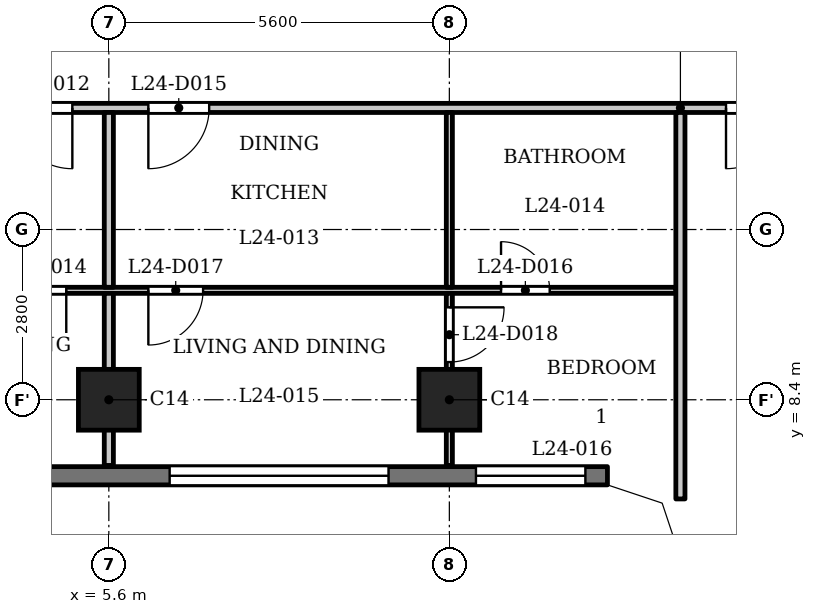
"""IFC4 building model, lengths in metres.
Left out: names, types, materials, properties, quantities, classifications, styles, units other than length and angle.
Written with IfcOpenShell. Run it as: python <this file> out.ifc"""

import sys

from ifc_helpers import new_model, si_unit, direction, frame, frame_2d, origin, origin_2d, place, context, subcontext, project, spatial, polyline, rectangle, outline, extrude, element, fill, save


model = new_model("IFC4")
c1 = context("Model", 3, precision=1e-05, world=origin(), true_north=direction((0.0, 1.0)))
c2 = subcontext(c1, "Body", "Model", "MODEL_VIEW")
j1 = project(units=[si_unit("LENGTHUNIT", "METRE"), si_unit("PLANEANGLEUNIT", "RADIAN")], contexts=[c1])
p1 = place(None, origin())
s1 = spatial("IfcSite", under=j1, at=p1, CompositionType="ELEMENT")
p2 = place(p1, origin())
s2 = spatial("IfcBuilding", under=s1, at=p2, CompositionType="ELEMENT")
p3 = place(p2, frame((0.0, 0.0, 97.3)))
s3 = spatial("IfcBuildingStorey", under=s2, at=p3, CompositionType="ELEMENT", Elevation=97.3)
for number, where, z_axis, x_axis in (
    (1, (5.6, 8.4, 0.0), (0.0, 0.0, 1.0), (1.0, 0.0, 0.0)),
    (2, (11.2, 8.4, 0.0), (0.0, 0.0, 1.0), (1.0, 0.0, 0.0)),
):
    element("IfcColumn", number, at=place(p3, frame(where, z_axis=z_axis, x_axis=x_axis)), inside=s3, PredefinedType="COLUMN", context=c2, shape_type="SweptSolid", body=[
        extrude(rectangle(XDim=1.0, YDim=1.0, at=origin_2d()), origin(), (0.0, 0.0, 1.0), 3.5),
    ])
p4 = place(p3, frame((-13.8, 7.15, 0.0), z_axis=(0.0, 0.0, 1.0), x_axis=(1.0, 0.0, 0.0)))
e3 = element("IfcWall", 3, at=p4, inside=s3, PredefinedType="SOLIDWALL", context=c2, shape_type="SweptSolid", body=[
    extrude(rectangle(XDim=27.6, YDim=0.3, at=frame_2d((13.8, 0.0))), origin(), (0.0, 0.0, 1.0), 3.2),
])
p5 = place(p4, frame((0.363, 0.0, 0.9)))
e4 = element("IfcOpeningElement", 4, at=p5, cuts=e3, PredefinedType="OPENING", context=c2, shape_type="SweptSolid", body=[
    extrude(rectangle(XDim=1.8, YDim=1.25, at=frame_2d((0.9, 0.625))), frame((0.0, 0.16, 0.0), z_axis=(0.0, -1.0, 0.0), x_axis=(1.0, 0.0, 0.0)), (0.0, 0.0, 1.0), 0.32),
])
p6 = place(p4, frame((3.6, 0.0, 1.2)))
e5 = element("IfcOpeningElement", 5, at=p6, cuts=e3, PredefinedType="OPENING", context=c2, shape_type="SweptSolid", body=[
    extrude(rectangle(XDim=3.6, YDim=0.95, at=frame_2d((1.8, 0.475))), frame((0.0, 0.16, 0.0), z_axis=(0.0, -1.0, 0.0), x_axis=(1.0, 0.0, 0.0)), (0.0, 0.0, 1.0), 0.32),
])
p7 = place(p4, frame((9.2, 0.0, 1.2)))
e6 = element("IfcOpeningElement", 6, at=p7, cuts=e3, PredefinedType="OPENING", context=c2, shape_type="SweptSolid", body=[
    extrude(rectangle(XDim=3.6, YDim=0.95, at=frame_2d((1.8, 0.475))), frame((0.0, 0.16, 0.0), z_axis=(0.0, -1.0, 0.0), x_axis=(1.0, 0.0, 0.0)), (0.0, 0.0, 1.0), 0.32),
])
p8 = place(p4, frame((14.8, 0.0, 1.2)))
e7 = element("IfcOpeningElement", 7, at=p8, cuts=e3, PredefinedType="OPENING", context=c2, shape_type="SweptSolid", body=[
    extrude(rectangle(XDim=3.6, YDim=0.95, at=frame_2d((1.8, 0.475))), frame((0.0, 0.16, 0.0), z_axis=(0.0, -1.0, 0.0), x_axis=(1.0, 0.0, 0.0)), (0.0, 0.0, 1.0), 0.32),
])
p9 = place(p4, frame((20.4, 0.0, 1.2)))
e8 = element("IfcOpeningElement", 8, at=p9, cuts=e3, PredefinedType="OPENING", context=c2, shape_type="SweptSolid", body=[
    extrude(rectangle(XDim=3.6, YDim=0.95, at=frame_2d((1.8, 0.475))), frame((0.0, 0.16, 0.0), z_axis=(0.0, -1.0, 0.0), x_axis=(1.0, 0.0, 0.0)), (0.0, 0.0, 1.0), 0.32),
])
p10 = place(p4, frame((25.438, 0.0, 0.9)))
e9 = element("IfcOpeningElement", 9, at=p10, cuts=e3, PredefinedType="OPENING", context=c2, shape_type="SweptSolid", body=[
    extrude(rectangle(XDim=1.8, YDim=1.25, at=frame_2d((0.9, 0.625))), frame((0.0, 0.16, 0.0), z_axis=(0.0, -1.0, 0.0), x_axis=(1.0, 0.0, 0.0)), (0.0, 0.0, 1.0), 0.32),
])
p11 = place(p3, frame((-14.925, 10.2, 0.0), z_axis=(0.0, 0.0, 1.0), x_axis=(1.0, 0.0, 0.0)))
e10 = element("IfcWall", 10, at=p11, inside=s3, PredefinedType="PARTITIONING", context=c2, shape_type="SweptSolid", body=[
    extrude(rectangle(XDim=29.85, YDim=0.1, at=frame_2d((14.925, 0.0))), origin(), (0.0, 0.0, 1.0), 3.2),
])
p12 = place(p11, frame((0.525, 0.0, 0.0)))
e11 = element("IfcOpeningElement", 11, at=p12, cuts=e10, PredefinedType="OPENING", context=c2, shape_type="SweptSolid", body=[
    extrude(rectangle(XDim=0.8, YDim=2.1, at=frame_2d((0.4, 1.05))), frame((0.0, 0.06, 0.0), z_axis=(0.0, -1.0, 0.0), x_axis=(1.0, 0.0, 0.0)), (0.0, 0.0, 1.0), 0.12),
])
p13 = place(p11, frame((4.375, 0.0, 0.0)))
e12 = element("IfcOpeningElement", 12, at=p13, cuts=e10, PredefinedType="OPENING", context=c2, shape_type="SweptSolid", body=[
    extrude(rectangle(XDim=0.9, YDim=2.1, at=frame_2d((0.45, 1.05))), frame((0.0, 0.06, 0.0), z_axis=(0.0, -1.0, 0.0), x_axis=(1.0, 0.0, 0.0)), (0.0, 0.0, 1.0), 0.12),
])
p14 = place(p11, frame((10.125, 0.0, 0.0)))
e13 = element("IfcOpeningElement", 13, at=p14, cuts=e10, PredefinedType="OPENING", context=c2, shape_type="SweptSolid", body=[
    extrude(rectangle(XDim=0.8, YDim=2.1, at=frame_2d((0.4, 1.05))), frame((0.0, 0.06, 0.0), z_axis=(0.0, -1.0, 0.0), x_axis=(1.0, 0.0, 0.0)), (0.0, 0.0, 1.0), 0.12),
])
p15 = place(p11, frame((12.975, 0.0, 0.0)))
e14 = element("IfcOpeningElement", 14, at=p15, cuts=e10, PredefinedType="OPENING", context=c2, shape_type="SweptSolid", body=[
    extrude(rectangle(XDim=0.9, YDim=2.1, at=frame_2d((0.45, 1.05))), frame((0.0, 0.06, 0.0), z_axis=(0.0, -1.0, 0.0), x_axis=(1.0, 0.0, 0.0)), (0.0, 0.0, 1.0), 0.12),
])
p16 = place(p11, frame((16.075, 0.0, 0.0)))
e15 = element("IfcOpeningElement", 15, at=p16, cuts=e10, PredefinedType="OPENING", context=c2, shape_type="SweptSolid", body=[
    extrude(rectangle(XDim=0.8, YDim=2.1, at=frame_2d((0.4, 1.05))), frame((0.0, 0.06, 0.0), z_axis=(0.0, -1.0, 0.0), x_axis=(1.0, 0.0, 0.0)), (0.0, 0.0, 1.0), 0.12),
])
p17 = place(p11, frame((18.925, 0.0, 0.0)))
e16 = element("IfcOpeningElement", 16, at=p17, cuts=e10, PredefinedType="OPENING", context=c2, shape_type="SweptSolid", body=[
    extrude(rectangle(XDim=0.9, YDim=2.1, at=frame_2d((0.45, 1.05))), frame((0.0, 0.06, 0.0), z_axis=(0.0, -1.0, 0.0), x_axis=(1.0, 0.0, 0.0)), (0.0, 0.0, 1.0), 0.12),
])
p18 = place(p11, frame((26.975, 0.0, 0.0)))
e17 = element("IfcOpeningElement", 17, at=p18, cuts=e10, PredefinedType="OPENING", context=c2, shape_type="SweptSolid", body=[
    extrude(rectangle(XDim=0.8, YDim=2.1, at=frame_2d((0.4, 1.05))), frame((0.0, 0.06, 0.0), z_axis=(0.0, -1.0, 0.0), x_axis=(1.0, 0.0, 0.0)), (0.0, 0.0, 1.0), 0.12),
])
p19 = place(p11, frame((21.175, 0.0, 0.0)))
e18 = element("IfcOpeningElement", 18, at=p19, cuts=e10, PredefinedType="OPENING", context=c2, shape_type="SweptSolid", body=[
    extrude(rectangle(XDim=0.9, YDim=2.1, at=frame_2d((0.45, 1.05))), frame((0.0, 0.06, 0.0), z_axis=(0.0, -1.0, 0.0), x_axis=(1.0, 0.0, 0.0)), (0.0, 0.0, 1.0), 0.12),
])
p20 = place(p3, frame((-17.4, 13.2, 0.0), z_axis=(0.0, 0.0, 1.0), x_axis=(1.0, 0.0, 0.0)))
e19 = element("IfcWall", 19, at=p20, inside=s3, PredefinedType="PARTITIONING", context=c2, shape_type="SweptSolid", body=[
    extrude(rectangle(XDim=34.8, YDim=0.15, at=frame_2d((17.4, 0.0))), origin(), (0.0, 0.0, 1.0), 3.2),
])
p21 = place(p20, frame((0.75, 0.0, 0.0)))
e20 = element("IfcOpeningElement", 20, at=p21, cuts=e19, PredefinedType="OPENING", context=c2, shape_type="SweptSolid", body=[
    extrude(rectangle(XDim=1.0, YDim=2.1, at=frame_2d((0.5, 1.05))), frame((0.0, 0.085, 0.0), z_axis=(0.0, -1.0, 0.0), x_axis=(1.0, 0.0, 0.0)), (0.0, 0.0, 1.0), 0.17),
])
p22 = place(p20, frame((33.15, 0.0, 0.0)))
e21 = element("IfcOpeningElement", 21, at=p22, cuts=e19, PredefinedType="OPENING", context=c2, shape_type="SweptSolid", body=[
    extrude(rectangle(XDim=1.0, YDim=2.1, at=frame_2d((0.5, 1.05))), frame((0.0, 0.085, 0.0), z_axis=(0.0, -1.0, 0.0), x_axis=(1.0, 0.0, 0.0)), (0.0, 0.0, 1.0), 0.17),
])
p23 = place(p20, frame((6.85, 0.0, 0.0)))
e22 = element("IfcOpeningElement", 22, at=p23, cuts=e19, PredefinedType="OPENING", context=c2, shape_type="SweptSolid", body=[
    extrude(rectangle(XDim=1.0, YDim=2.1, at=frame_2d((0.5, 1.05))), frame((0.0, 0.085, 0.0), z_axis=(0.0, -1.0, 0.0), x_axis=(1.0, 0.0, 0.0)), (0.0, 0.0, 1.0), 0.17),
])
p24 = place(p20, frame((15.45, 0.0, 0.0)))
e23 = element("IfcOpeningElement", 23, at=p24, cuts=e19, PredefinedType="OPENING", context=c2, shape_type="SweptSolid", body=[
    extrude(rectangle(XDim=1.0, YDim=2.1, at=frame_2d((0.5, 1.05))), frame((0.0, 0.085, 0.0), z_axis=(0.0, -1.0, 0.0), x_axis=(1.0, 0.0, 0.0)), (0.0, 0.0, 1.0), 0.17),
])
p25 = place(p20, frame((21.4, 0.0, 0.0)))
e24 = element("IfcOpeningElement", 24, at=p25, cuts=e19, PredefinedType="OPENING", context=c2, shape_type="SweptSolid", body=[
    extrude(rectangle(XDim=1.0, YDim=2.1, at=frame_2d((0.5, 1.05))), frame((0.0, 0.085, 0.0), z_axis=(0.0, -1.0, 0.0), x_axis=(1.0, 0.0, 0.0)), (0.0, 0.0, 1.0), 0.17),
])
p26 = place(p20, frame((23.65, 0.0, 0.0)))
e25 = element("IfcOpeningElement", 25, at=p26, cuts=e19, PredefinedType="OPENING", context=c2, shape_type="SweptSolid", body=[
    extrude(rectangle(XDim=1.0, YDim=2.1, at=frame_2d((0.5, 1.05))), frame((0.0, 0.085, 0.0), z_axis=(0.0, -1.0, 0.0), x_axis=(1.0, 0.0, 0.0)), (0.0, 0.0, 1.0), 0.17),
])
p27 = place(p3, frame((5.6, 7.32, 0.0), z_axis=(0.0, 0.0, 1.0), x_axis=(0.0, 1.0, 0.0)))
e26 = element("IfcWall", 26, at=p27, inside=s3, PredefinedType="PARTITIONING", context=c2, shape_type="SweptSolid", body=[
    extrude(rectangle(XDim=2.83, YDim=0.15, at=frame_2d((1.415, 0.0))), origin(), (0.0, 0.0, 1.0), 3.2),
])
p28 = place(p3, frame((5.6, 10.25, 0.0), z_axis=(0.0, 0.0, 1.0), x_axis=(0.0, 1.0, 0.0)))
e27 = element("IfcWall", 27, at=p28, inside=s3, PredefinedType="PARTITIONING", context=c2, shape_type="SweptSolid", body=[
    extrude(rectangle(XDim=2.875, YDim=0.15, at=frame_2d((1.438, 0.0))), origin(), (0.0, 0.0, 1.0), 3.2),
])
p29 = place(p3, frame((11.2, 7.32, 0.0), z_axis=(0.0, 0.0, 1.0), x_axis=(0.0, 1.0, 0.0)))
e28 = element("IfcWall", 28, at=p29, inside=s3, PredefinedType="PARTITIONING", context=c2, shape_type="SweptSolid", body=[
    extrude(rectangle(XDim=2.83, YDim=0.1, at=frame_2d((1.415, 0.0))), origin(), (0.0, 0.0, 1.0), 3.2),
])
p30 = place(p29, frame((1.7, 0.0, 0.0)))
e29 = element("IfcOpeningElement", 29, at=p30, cuts=e28, PredefinedType="OPENING", context=c2, shape_type="SweptSolid", body=[
    extrude(rectangle(XDim=0.9, YDim=2.1, at=frame_2d((0.45, 1.05))), frame((0.0, 0.06, 0.0), z_axis=(0.0, -1.0, 0.0), x_axis=(1.0, 0.0, 0.0)), (0.0, 0.0, 1.0), 0.12),
])
p31 = place(p3, frame((11.2, 10.25, 0.0), z_axis=(0.0, 0.0, 1.0), x_axis=(0.0, 1.0, 0.0)))
e30 = element("IfcWall", 30, at=p31, inside=s3, PredefinedType="PARTITIONING", context=c2, shape_type="SweptSolid", body=[
    extrude(rectangle(XDim=2.875, YDim=0.1, at=frame_2d((1.438, 0.0))), origin(), (0.0, 0.0, 1.0), 3.2),
])
p32 = place(p3, frame((15.0, 6.769, 0.0), z_axis=(0.0, 0.0, 1.0), x_axis=(0.0, 1.0, 0.0)))
e31 = element("IfcWall", 31, at=p32, inside=s3, PredefinedType="PARTITIONING", context=c2, shape_type="SweptSolid", body=[
    extrude(rectangle(XDim=6.356, YDim=0.15, at=frame_2d((3.178, 0.0))), origin(), (0.0, 0.0, 1.0), 3.2),
])
p33 = place(p3, origin())
e32 = element("IfcWall", 32, at=p33, inside=s3, PredefinedType="SOLIDWALL", context=c2, shape_type="SweptSolid", body=[
    extrude(outline(polyline([(14.937, 6.937), (13.849, 7.3), (13.8, 7.3), (13.8, 7.0), (14.7, 6.7), (15.0, 5.8), (15.3, 5.8), (15.3, 5.849), (14.937, 6.937)])), origin(), (0.0, 0.0, 1.0), 3.2),
])
p34 = place(p22, origin())
e33 = element("IfcDoor", 33, at=p34, inside=s3, OperationType="SINGLE_SWING_LEFT", PredefinedType="DOOR", context=c2, shape_type="SweptSolid", body=[
    extrude(rectangle(XDim=1.0, YDim=2.1, at=frame_2d((0.5, 1.05))), frame((0.0, 0.025, 0.0), z_axis=(0.0, -1.0, 0.0), x_axis=(1.0, 0.0, 0.0)), (0.0, 0.0, 1.0), 0.05),
])
fill(e21, e33)
p35 = place(p25, origin())
e34 = element("IfcDoor", 34, at=p35, inside=s3, OperationType="SINGLE_SWING_RIGHT", PredefinedType="DOOR", context=c2, shape_type="SweptSolid", body=[
    extrude(rectangle(XDim=1.0, YDim=2.1, at=frame_2d((0.5, 1.05))), frame((0.0, 0.025, 0.0), z_axis=(0.0, -1.0, 0.0), x_axis=(1.0, 0.0, 0.0)), (0.0, 0.0, 1.0), 0.05),
])
fill(e24, e34)
p36 = place(p17, origin())
e35 = element("IfcDoor", 35, at=p36, inside=s3, OperationType="SINGLE_SWING_RIGHT", PredefinedType="DOOR", context=c2, shape_type="SweptSolid", body=[
    extrude(rectangle(XDim=0.9, YDim=2.1, at=frame_2d((0.45, 1.05))), frame((0.0, 0.025, 0.0), z_axis=(0.0, -1.0, 0.0), x_axis=(1.0, 0.0, 0.0)), (0.0, 0.0, 1.0), 0.05),
])
fill(e16, e35)
p37 = place(p26, origin())
e36 = element("IfcDoor", 36, at=p37, inside=s3, OperationType="SINGLE_SWING_LEFT", PredefinedType="DOOR", context=c2, shape_type="SweptSolid", body=[
    extrude(rectangle(XDim=1.0, YDim=2.1, at=frame_2d((0.5, 1.05))), frame((0.0, 0.025, 0.0), z_axis=(0.0, -1.0, 0.0), x_axis=(1.0, 0.0, 0.0)), (0.0, 0.0, 1.0), 0.05),
])
fill(e25, e36)
p38 = place(p18, origin())
e37 = element("IfcDoor", 37, at=p38, inside=s3, OperationType="SINGLE_SWING_RIGHT", PredefinedType="DOOR", context=c2, shape_type="SweptSolid", body=[
    extrude(rectangle(XDim=0.8, YDim=2.1, at=frame_2d((0.4, 1.05))), frame((0.0, 0.025, 0.0), z_axis=(0.0, -1.0, 0.0), x_axis=(1.0, 0.0, 0.0)), (0.0, 0.0, 1.0), 0.05),
])
fill(e17, e37)
p39 = place(p19, origin())
e38 = element("IfcDoor", 38, at=p39, inside=s3, OperationType="SINGLE_SWING_LEFT", PredefinedType="DOOR", context=c2, shape_type="SweptSolid", body=[
    extrude(rectangle(XDim=0.9, YDim=2.1, at=frame_2d((0.45, 1.05))), frame((0.0, 0.025, 0.0), z_axis=(0.0, -1.0, 0.0), x_axis=(1.0, 0.0, 0.0)), (0.0, 0.0, 1.0), 0.05),
])
fill(e18, e38)
p40 = place(p30, origin())
e39 = element("IfcDoor", 39, at=p40, inside=s3, OperationType="SINGLE_SWING_RIGHT", PredefinedType="DOOR", context=c2, shape_type="SweptSolid", body=[
    extrude(rectangle(XDim=0.9, YDim=2.1, at=frame_2d((0.45, 1.05))), frame((0.0, 0.025, 0.0), z_axis=(0.0, -1.0, 0.0), x_axis=(1.0, 0.0, 0.0)), (0.0, 0.0, 1.0), 0.05),
])
fill(e29, e39)
p41 = place(p9, origin())
e40 = element("IfcWindow", 40, at=p41, inside=s3, PartitioningType="SINGLE_PANEL", PredefinedType="WINDOW", context=c2, shape_type="SweptSolid", body=[
    extrude(rectangle(XDim=3.6, YDim=0.95, at=frame_2d((1.8, 0.475))), frame((0.0, 0.03, 0.0), z_axis=(0.0, -1.0, 0.0), x_axis=(1.0, 0.0, 0.0)), (0.0, 0.0, 1.0), 0.06),
])
fill(e8, e40)
p42 = place(p10, origin())
e41 = element("IfcWindow", 41, at=p42, inside=s3, PartitioningType="SINGLE_PANEL", PredefinedType="WINDOW", context=c2, shape_type="SweptSolid", body=[
    extrude(rectangle(XDim=1.8, YDim=1.25, at=frame_2d((0.9, 0.625))), frame((0.0, 0.03, 0.0), z_axis=(0.0, -1.0, 0.0), x_axis=(1.0, 0.0, 0.0)), (0.0, 0.0, 1.0), 0.06),
])
fill(e9, e41)
save(model, sys.argv[1])
